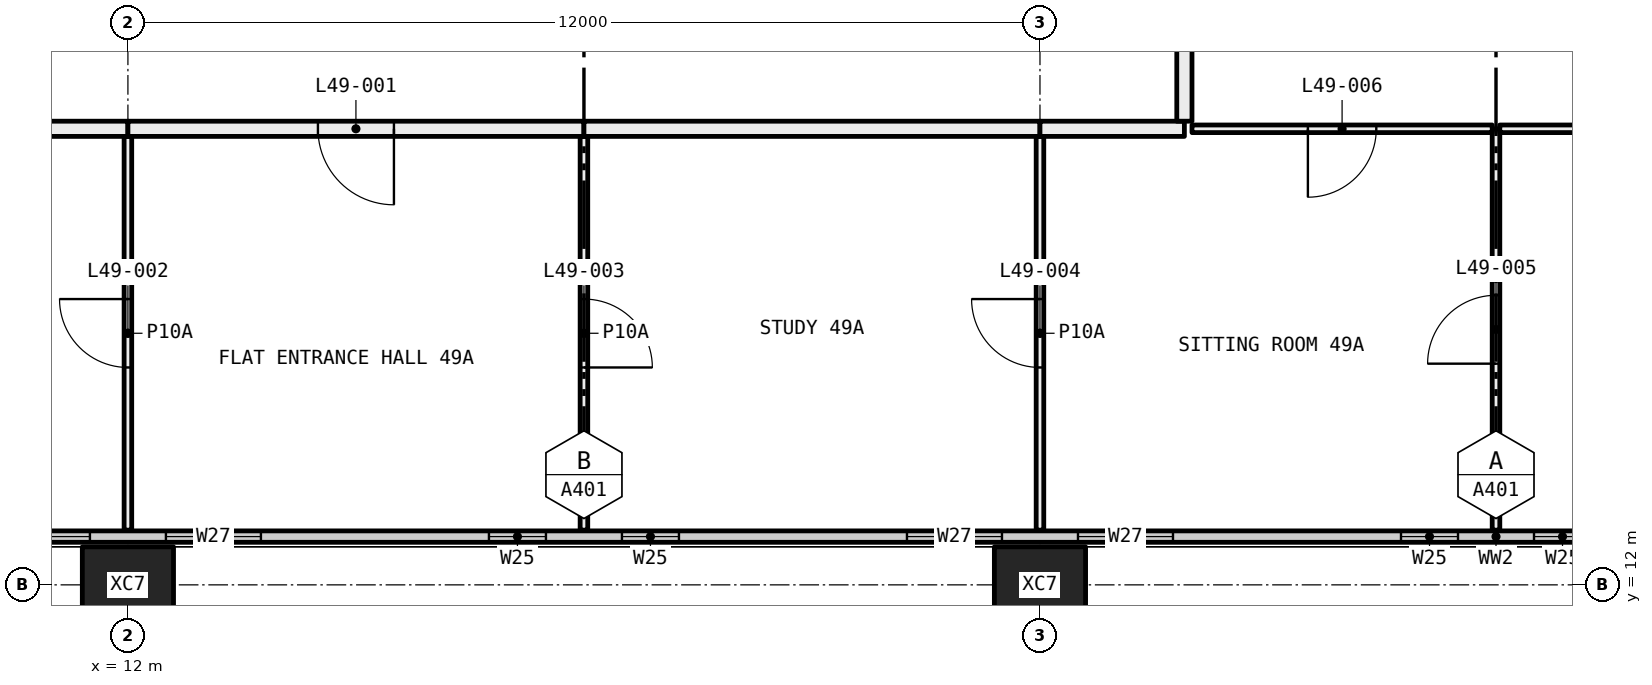
"""IFC4 building model, lengths in metres.
Left out: names, types, materials, properties, quantities, classifications, styles, units other than length and angle.
Written with IfcOpenShell. Run it as: python <this file> out.ifc"""

import sys

from ifc_helpers import new_model, si_unit, direction, frame, frame_2d, origin, origin_2d, place, context, subcontext, project, spatial, rectangle, hollow_rectangle, extrude, element, fill, save


model = new_model("IFC4")
c1 = context("Model", 3, precision=1e-05, world=origin(), true_north=direction((0.0, 1.0)))
c2 = subcontext(c1, "Body", "Model", "MODEL_VIEW")
j1 = project(units=[si_unit("LENGTHUNIT", "METRE"), si_unit("PLANEANGLEUNIT", "RADIAN")], contexts=[c1])
p1 = place(None, origin())
s1 = spatial("IfcSite", under=j1, at=p1, CompositionType="ELEMENT")
p2 = place(p1, origin())
s2 = spatial("IfcBuilding", under=s1, at=p2, CompositionType="ELEMENT")
p3 = place(p2, frame((0.0, 0.0, 185.85)))
s3 = spatial("IfcBuildingStorey", under=s2, at=p3, CompositionType="ELEMENT", Elevation=185.85)
for number, where, z_axis, x_axis in (
    (1, (12.0, 12.0, -0.4), (0.0, 0.0, 1.0), (1.0, 0.0, 0.0)),
    (2, (24.0, 12.0, -0.4), (0.0, 0.0, 1.0), (1.0, 0.0, 0.0)),
):
    element("IfcColumn", number, at=place(p3, frame(where, z_axis=z_axis, x_axis=x_axis)), inside=s3, PredefinedType="COLUMN", context=c2, shape_type="SweptSolid", body=[
        extrude(hollow_rectangle(XDim=1.2, YDim=1.0, WallThickness=0.045, at=origin_2d()), origin(), (0.0, 0.0, 1.0), 3.45),
    ])
p4 = place(p3, frame((6.56, 12.635, 0.0), z_axis=(0.0, 0.0, 1.0), x_axis=(1.0, 0.0, 0.0)))
e3 = element("IfcWall", 3, at=p4, inside=s3, PredefinedType="ELEMENTEDWALL", context=c2, shape_type="SweptSolid", body=[
    extrude(rectangle(XDim=46.88, YDim=0.15, at=frame_2d((23.44, 0.0))), origin(), (0.0, 0.0, 1.0), 3.05),
])
p5 = place(p4, frame((0.44, 0.0, 0.45)))
e4 = element("IfcOpeningElement", 4, at=p5, cuts=e3, PredefinedType="OPENING", context=c2, shape_type="SweptSolid", body=[
    extrude(rectangle(XDim=4.5, YDim=2.55, at=frame_2d((2.25, 1.275))), frame((0.0, 0.085, 0.0), z_axis=(0.0, -1.0, 0.0), x_axis=(1.0, 0.0, 0.0)), (0.0, 0.0, 1.0), 0.17),
])
p6 = place(p4, frame((5.94, 0.0, 0.45)))
e5 = element("IfcOpeningElement", 5, at=p6, cuts=e3, PredefinedType="OPENING", context=c2, shape_type="SweptSolid", body=[
    extrude(rectangle(XDim=1.25, YDim=2.55, at=frame_2d((0.625, 1.275))), frame((0.0, 0.085, 0.0), z_axis=(0.0, -1.0, 0.0), x_axis=(1.0, 0.0, 0.0)), (0.0, 0.0, 1.0), 0.17),
])
p7 = place(p4, frame((10.19, 0.0, 0.45)))
e6 = element("IfcOpeningElement", 6, at=p7, cuts=e3, PredefinedType="OPENING", context=c2, shape_type="SweptSolid", body=[
    extrude(rectangle(XDim=0.75, YDim=2.55, at=frame_2d((0.375, 1.275))), frame((0.0, 0.085, 0.0), z_axis=(0.0, -1.0, 0.0), x_axis=(1.0, 0.0, 0.0)), (0.0, 0.0, 1.0), 0.17),
])
p8 = place(p4, frame((11.94, 0.0, 0.45)))
e7 = element("IfcOpeningElement", 7, at=p8, cuts=e3, PredefinedType="OPENING", context=c2, shape_type="SweptSolid", body=[
    extrude(rectangle(XDim=0.75, YDim=2.55, at=frame_2d((0.375, 1.275))), frame((0.0, 0.085, 0.0), z_axis=(0.0, -1.0, 0.0), x_axis=(1.0, 0.0, 0.0)), (0.0, 0.0, 1.0), 0.17),
])
p9 = place(p4, frame((15.69, 0.0, 0.45)))
e8 = element("IfcOpeningElement", 8, at=p9, cuts=e3, PredefinedType="OPENING", context=c2, shape_type="SweptSolid", body=[
    extrude(rectangle(XDim=1.25, YDim=2.55, at=frame_2d((0.625, 1.275))), frame((0.0, 0.085, 0.0), z_axis=(0.0, -1.0, 0.0), x_axis=(1.0, 0.0, 0.0)), (0.0, 0.0, 1.0), 0.17),
])
p10 = place(p4, frame((17.94, 0.0, 0.45)))
e9 = element("IfcOpeningElement", 9, at=p10, cuts=e3, PredefinedType="OPENING", context=c2, shape_type="SweptSolid", body=[
    extrude(rectangle(XDim=1.25, YDim=2.55, at=frame_2d((0.625, 1.275))), frame((0.0, 0.085, 0.0), z_axis=(0.0, -1.0, 0.0), x_axis=(1.0, 0.0, 0.0)), (0.0, 0.0, 1.0), 0.17),
])
p11 = place(p4, frame((22.19, 0.0, 0.45)))
e10 = element("IfcOpeningElement", 10, at=p11, cuts=e3, PredefinedType="OPENING", context=c2, shape_type="SweptSolid", body=[
    extrude(rectangle(XDim=0.75, YDim=2.55, at=frame_2d((0.375, 1.275))), frame((0.0, 0.085, 0.0), z_axis=(0.0, -1.0, 0.0), x_axis=(1.0, 0.0, 0.0)), (0.0, 0.0, 1.0), 0.17),
])
p12 = place(p4, frame((23.94, 0.0, 0.45)))
e11 = element("IfcOpeningElement", 11, at=p12, cuts=e3, PredefinedType="OPENING", context=c2, shape_type="SweptSolid", body=[
    extrude(rectangle(XDim=0.75, YDim=2.55, at=frame_2d((0.375, 1.275))), frame((0.0, 0.085, 0.0), z_axis=(0.0, -1.0, 0.0), x_axis=(1.0, 0.0, 0.0)), (0.0, 0.0, 1.0), 0.17),
])
p13 = place(p4, frame((27.69, 0.0, 0.45)))
e12 = element("IfcOpeningElement", 12, at=p13, cuts=e3, PredefinedType="OPENING", context=c2, shape_type="SweptSolid", body=[
    extrude(rectangle(XDim=1.25, YDim=2.55, at=frame_2d((0.625, 1.275))), frame((0.0, 0.085, 0.0), z_axis=(0.0, -1.0, 0.0), x_axis=(1.0, 0.0, 0.0)), (0.0, 0.0, 1.0), 0.17),
])
p14 = place(p4, frame((29.94, 0.0, 0.45)))
e13 = element("IfcOpeningElement", 13, at=p14, cuts=e3, PredefinedType="OPENING", context=c2, shape_type="SweptSolid", body=[
    extrude(rectangle(XDim=1.25, YDim=2.55, at=frame_2d((0.625, 1.275))), frame((0.0, 0.085, 0.0), z_axis=(0.0, -1.0, 0.0), x_axis=(1.0, 0.0, 0.0)), (0.0, 0.0, 1.0), 0.17),
])
p15 = place(p4, frame((34.19, 0.0, 0.45)))
e14 = element("IfcOpeningElement", 14, at=p15, cuts=e3, PredefinedType="OPENING", context=c2, shape_type="SweptSolid", body=[
    extrude(rectangle(XDim=0.75, YDim=2.55, at=frame_2d((0.375, 1.275))), frame((0.0, 0.085, 0.0), z_axis=(0.0, -1.0, 0.0), x_axis=(1.0, 0.0, 0.0)), (0.0, 0.0, 1.0), 0.17),
])
p16 = place(p4, frame((35.94, 0.0, 0.45)))
e15 = element("IfcOpeningElement", 15, at=p16, cuts=e3, PredefinedType="OPENING", context=c2, shape_type="SweptSolid", body=[
    extrude(rectangle(XDim=0.75, YDim=2.55, at=frame_2d((0.375, 1.275))), frame((0.0, 0.085, 0.0), z_axis=(0.0, -1.0, 0.0), x_axis=(1.0, 0.0, 0.0)), (0.0, 0.0, 1.0), 0.17),
])
p17 = place(p4, frame((39.69, 0.0, 0.45)))
e16 = element("IfcOpeningElement", 16, at=p17, cuts=e3, PredefinedType="OPENING", context=c2, shape_type="SweptSolid", body=[
    extrude(rectangle(XDim=1.25, YDim=2.55, at=frame_2d((0.625, 1.275))), frame((0.0, 0.085, 0.0), z_axis=(0.0, -1.0, 0.0), x_axis=(1.0, 0.0, 0.0)), (0.0, 0.0, 1.0), 0.17),
])
p18 = place(p4, frame((41.94, 0.0, 0.45)))
e17 = element("IfcOpeningElement", 17, at=p18, cuts=e3, PredefinedType="OPENING", context=c2, shape_type="SweptSolid", body=[
    extrude(rectangle(XDim=4.5, YDim=2.55, at=frame_2d((2.25, 1.275))), frame((0.0, 0.085, 0.0), z_axis=(0.0, -1.0, 0.0), x_axis=(1.0, 0.0, 0.0)), (0.0, 0.0, 1.0), 0.17),
])
p19 = place(p3, frame((12.0, 12.72, 0.0), z_axis=(0.0, 0.0, 1.0), x_axis=(0.0, 1.0, 0.0)))
e18 = element("IfcWall", 18, at=p19, inside=s3, PredefinedType="PARTITIONING", context=c2, shape_type="SweptSolid", body=[
    extrude(rectangle(XDim=5.18, YDim=0.1, at=frame_2d((2.59, 0.0))), origin(), (0.0, 0.0, 1.0), 3.05),
])
p20 = place(p19, frame((2.14, 0.0, 0.0)))
e19 = element("IfcOpeningElement", 19, at=p20, cuts=e18, PredefinedType="OPENING", context=c2, shape_type="SweptSolid", body=[
    extrude(rectangle(XDim=0.9, YDim=2.1, at=frame_2d((0.45, 1.05))), frame((0.0, 0.06, 0.0), z_axis=(0.0, -1.0, 0.0), x_axis=(1.0, 0.0, 0.0)), (0.0, 0.0, 1.0), 0.12),
])
p21 = place(p3, frame((12.0, 18.0, 0.0), z_axis=(0.0, 0.0, 1.0), x_axis=(-1.0, 0.0, 0.0)))
e20 = element("IfcWall", 20, at=p21, inside=s3, PredefinedType="PARTITIONING", context=c2, shape_type="SweptSolid", body=[
    extrude(rectangle(XDim=1.9, YDim=0.2, at=frame_2d((0.95, 0.0))), origin(), (0.0, 0.0, 1.0), 3.05),
])
p22 = place(p3, frame((18.0, 12.72, 0.0), z_axis=(0.0, 0.0, 1.0), x_axis=(0.0, 1.0, 0.0)))
e21 = element("IfcWall", 21, at=p22, inside=s3, PredefinedType="PARTITIONING", context=c2, shape_type="SweptSolid", body=[
    extrude(rectangle(XDim=5.18, YDim=0.1, at=frame_2d((2.59, 0.0))), origin(), (0.0, 0.0, 1.0), 3.05),
])
p23 = place(p22, frame((2.14, 0.0, 0.0)))
e22 = element("IfcOpeningElement", 22, at=p23, cuts=e21, PredefinedType="OPENING", context=c2, shape_type="SweptSolid", body=[
    extrude(rectangle(XDim=0.9, YDim=2.1, at=frame_2d((0.45, 1.05))), frame((0.0, 0.06, 0.0), z_axis=(0.0, -1.0, 0.0), x_axis=(1.0, 0.0, 0.0)), (0.0, 0.0, 1.0), 0.12),
])
p24 = place(p3, frame((18.0, 18.0, 0.0), z_axis=(0.0, 0.0, 1.0), x_axis=(-1.0, 0.0, 0.0)))
e23 = element("IfcWall", 23, at=p24, inside=s3, PredefinedType="PARTITIONING", context=c2, shape_type="SweptSolid", body=[
    extrude(rectangle(XDim=6.0, YDim=0.2, at=frame_2d((3.0, 0.0))), origin(), (0.0, 0.0, 1.0), 3.05),
])
p25 = place(p24, frame((2.5, 0.0, 0.0)))
e24 = element("IfcOpeningElement", 24, at=p25, cuts=e23, PredefinedType="OPENING", context=c2, shape_type="SweptSolid", body=[
    extrude(rectangle(XDim=1.0, YDim=2.1, at=frame_2d((0.5, 1.05))), frame((0.0, 0.11, 0.0), z_axis=(0.0, -1.0, 0.0), x_axis=(1.0, 0.0, 0.0)), (0.0, 0.0, 1.0), 0.22),
])
p26 = place(p3, frame((24.0, 12.72, 0.0), z_axis=(0.0, 0.0, 1.0), x_axis=(0.0, 1.0, 0.0)))
e25 = element("IfcWall", 25, at=p26, inside=s3, PredefinedType="PARTITIONING", context=c2, shape_type="SweptSolid", body=[
    extrude(rectangle(XDim=5.18, YDim=0.1, at=frame_2d((2.59, 0.0))), origin(), (0.0, 0.0, 1.0), 3.05),
])
p27 = place(p26, frame((2.14, 0.0, 0.0)))
e26 = element("IfcOpeningElement", 26, at=p27, cuts=e25, PredefinedType="OPENING", context=c2, shape_type="SweptSolid", body=[
    extrude(rectangle(XDim=0.9, YDim=2.1, at=frame_2d((0.45, 1.05))), frame((0.0, 0.06, 0.0), z_axis=(0.0, -1.0, 0.0), x_axis=(1.0, 0.0, 0.0)), (0.0, 0.0, 1.0), 0.12),
])
p28 = place(p3, frame((24.0, 18.0, 0.0), z_axis=(0.0, 0.0, 1.0), x_axis=(-1.0, 0.0, 0.0)))
e27 = element("IfcWall", 27, at=p28, inside=s3, PredefinedType="PARTITIONING", context=c2, shape_type="SweptSolid", body=[
    extrude(rectangle(XDim=6.0, YDim=0.2, at=frame_2d((3.0, 0.0))), origin(), (0.0, 0.0, 1.0), 3.05),
])
p29 = place(p3, frame((30.0, 12.72, 0.0), z_axis=(0.0, 0.0, 1.0), x_axis=(0.0, 1.0, 0.0)))
e28 = element("IfcWall", 28, at=p29, inside=s3, PredefinedType="PARTITIONING", context=c2, shape_type="SweptSolid", body=[
    extrude(rectangle(XDim=5.28, YDim=0.1, at=frame_2d((2.64, 0.0))), origin(), (0.0, 0.0, 1.0), 3.05),
])
p30 = place(p29, frame((2.19, 0.0, 0.0)))
e29 = element("IfcOpeningElement", 29, at=p30, cuts=e28, PredefinedType="OPENING", context=c2, shape_type="SweptSolid", body=[
    extrude(rectangle(XDim=0.9, YDim=2.1, at=frame_2d((0.45, 1.05))), frame((0.0, 0.06, 0.0), z_axis=(0.0, -1.0, 0.0), x_axis=(1.0, 0.0, 0.0)), (0.0, 0.0, 1.0), 0.12),
])
p31 = place(p3, frame((29.95, 18.0, 0.0), z_axis=(0.0, 0.0, 1.0), x_axis=(-1.0, 0.0, 0.0)))
e30 = element("IfcWall", 30, at=p31, inside=s3, PredefinedType="PARTITIONING", context=c2, shape_type="SweptSolid", body=[
    extrude(rectangle(XDim=3.95, YDim=0.1, at=frame_2d((1.975, 0.0))), origin(), (0.0, 0.0, 1.0), 3.05),
])
p32 = place(p31, frame((1.525, 0.0, 0.0)))
e31 = element("IfcOpeningElement", 31, at=p32, cuts=e30, PredefinedType="OPENING", context=c2, shape_type="SweptSolid", body=[
    extrude(rectangle(XDim=0.9, YDim=2.1, at=frame_2d((0.45, 1.05))), frame((0.0, 0.06, 0.0), z_axis=(0.0, -1.0, 0.0), x_axis=(1.0, 0.0, 0.0)), (0.0, 0.0, 1.0), 0.12),
])
p33 = place(p3, frame((25.9, 18.0, 0.0), z_axis=(0.0, 0.0, 1.0), x_axis=(-1.0, 0.0, 0.0)))
e32 = element("IfcWall", 32, at=p33, inside=s3, PredefinedType="PARTITIONING", context=c2, shape_type="SweptSolid", body=[
    extrude(rectangle(XDim=1.9, YDim=0.2, at=frame_2d((0.95, 0.0))), origin(), (0.0, 0.0, 1.0), 3.05),
])
p34 = place(p3, frame((31.5, 18.0, 0.0), z_axis=(0.0, 0.0, 1.0), x_axis=(-1.0, 0.0, 0.0)))
e33 = element("IfcWall", 33, at=p34, inside=s3, PredefinedType="PARTITIONING", context=c2, shape_type="SweptSolid", body=[
    extrude(rectangle(XDim=1.45, YDim=0.1, at=frame_2d((0.725, 0.0))), origin(), (0.0, 0.0, 1.0), 3.05),
])
p35 = place(p3, frame((25.9, 23.9, 0.0), z_axis=(0.0, 0.0, 1.0), x_axis=(0.0, -1.0, 0.0)))
e34 = element("IfcWall", 34, at=p35, inside=s3, PredefinedType="PARTITIONING", context=c2, shape_type="SweptSolid", body=[
    extrude(rectangle(XDim=5.8, YDim=0.2, at=frame_2d((2.9, 0.0))), origin(), (0.0, 0.0, 1.0), 3.05),
])
p36 = place(p5, origin())
e35 = element("IfcWindow", 35, at=p36, inside=s3, PartitioningType="SINGLE_PANEL", PredefinedType="WINDOW", context=c2, shape_type="SweptSolid", body=[
    extrude(rectangle(XDim=4.5, YDim=2.55, at=frame_2d((2.25, 1.275))), frame((0.0, 0.03, 0.0), z_axis=(0.0, -1.0, 0.0), x_axis=(1.0, 0.0, 0.0)), (0.0, 0.0, 1.0), 0.06),
])
fill(e4, e35)
p37 = place(p6, origin())
e36 = element("IfcWindow", 36, at=p37, inside=s3, PartitioningType="SINGLE_PANEL", PredefinedType="WINDOW", context=c2, shape_type="SweptSolid", body=[
    extrude(rectangle(XDim=1.25, YDim=2.55, at=frame_2d((0.625, 1.275))), frame((0.0, 0.03, 0.0), z_axis=(0.0, -1.0, 0.0), x_axis=(1.0, 0.0, 0.0)), (0.0, 0.0, 1.0), 0.06),
])
fill(e5, e36)
p38 = place(p7, origin())
e37 = element("IfcWindow", 37, at=p38, inside=s3, PartitioningType="SINGLE_PANEL", PredefinedType="WINDOW", context=c2, shape_type="SweptSolid", body=[
    extrude(rectangle(XDim=0.75, YDim=2.55, at=frame_2d((0.375, 1.275))), frame((0.0, 0.03, 0.0), z_axis=(0.0, -1.0, 0.0), x_axis=(1.0, 0.0, 0.0)), (0.0, 0.0, 1.0), 0.06),
])
fill(e6, e37)
p39 = place(p8, origin())
e38 = element("IfcWindow", 38, at=p39, inside=s3, PartitioningType="SINGLE_PANEL", PredefinedType="WINDOW", context=c2, shape_type="SweptSolid", body=[
    extrude(rectangle(XDim=0.75, YDim=2.55, at=frame_2d((0.375, 1.275))), frame((0.0, 0.03, 0.0), z_axis=(0.0, -1.0, 0.0), x_axis=(1.0, 0.0, 0.0)), (0.0, 0.0, 1.0), 0.06),
])
fill(e7, e38)
p40 = place(p9, origin())
e39 = element("IfcWindow", 39, at=p40, inside=s3, PartitioningType="SINGLE_PANEL", PredefinedType="WINDOW", context=c2, shape_type="SweptSolid", body=[
    extrude(rectangle(XDim=1.25, YDim=2.55, at=frame_2d((0.625, 1.275))), frame((0.0, 0.03, 0.0), z_axis=(0.0, -1.0, 0.0), x_axis=(1.0, 0.0, 0.0)), (0.0, 0.0, 1.0), 0.06),
])
fill(e8, e39)
p41 = place(p10, origin())
e40 = element("IfcWindow", 40, at=p41, inside=s3, PartitioningType="SINGLE_PANEL", PredefinedType="WINDOW", context=c2, shape_type="SweptSolid", body=[
    extrude(rectangle(XDim=1.25, YDim=2.55, at=frame_2d((0.625, 1.275))), frame((0.0, 0.03, 0.0), z_axis=(0.0, -1.0, 0.0), x_axis=(1.0, 0.0, 0.0)), (0.0, 0.0, 1.0), 0.06),
])
fill(e9, e40)
p42 = place(p11, origin())
e41 = element("IfcWindow", 41, at=p42, inside=s3, PartitioningType="SINGLE_PANEL", PredefinedType="WINDOW", context=c2, shape_type="SweptSolid", body=[
    extrude(rectangle(XDim=0.75, YDim=2.55, at=frame_2d((0.375, 1.275))), frame((0.0, 0.03, 0.0), z_axis=(0.0, -1.0, 0.0), x_axis=(1.0, 0.0, 0.0)), (0.0, 0.0, 1.0), 0.06),
])
fill(e10, e41)
p43 = place(p12, origin())
e42 = element("IfcWindow", 42, at=p43, inside=s3, PartitioningType="SINGLE_PANEL", PredefinedType="WINDOW", context=c2, shape_type="SweptSolid", body=[
    extrude(rectangle(XDim=0.75, YDim=2.55, at=frame_2d((0.375, 1.275))), frame((0.0, 0.03, 0.0), z_axis=(0.0, -1.0, 0.0), x_axis=(1.0, 0.0, 0.0)), (0.0, 0.0, 1.0), 0.06),
])
fill(e11, e42)
p44 = place(p25, origin())
e43 = element("IfcDoor", 43, at=p44, inside=s3, OperationType="SINGLE_SWING_RIGHT", PredefinedType="DOOR", context=c2, shape_type="SweptSolid", body=[
    extrude(rectangle(XDim=1.0, YDim=2.1, at=frame_2d((0.5, 1.05))), frame((0.0, 0.025, 0.0), z_axis=(0.0, -1.0, 0.0), x_axis=(1.0, 0.0, 0.0)), (0.0, 0.0, 1.0), 0.05),
])
fill(e24, e43)
p45 = place(p20, origin())
e44 = element("IfcDoor", 44, at=p45, inside=s3, OperationType="SINGLE_SWING_LEFT", PredefinedType="DOOR", context=c2, shape_type="SweptSolid", body=[
    extrude(rectangle(XDim=0.9, YDim=2.1, at=frame_2d((0.45, 1.05))), frame((0.0, 0.025, 0.0), z_axis=(0.0, -1.0, 0.0), x_axis=(1.0, 0.0, 0.0)), (0.0, 0.0, 1.0), 0.05),
])
fill(e19, e44)
p46 = place(p23, frame((0.9, 0.0, 0.0), x_axis=(-1.0, 0.0, 0.0)))
e45 = element("IfcDoor", 45, at=p46, inside=s3, OperationType="SINGLE_SWING_LEFT", PredefinedType="DOOR", context=c2, shape_type="SweptSolid", body=[
    extrude(rectangle(XDim=0.9, YDim=2.1, at=frame_2d((0.45, 1.05))), frame((0.0, 0.025, 0.0), z_axis=(0.0, -1.0, 0.0), x_axis=(1.0, 0.0, 0.0)), (0.0, 0.0, 1.0), 0.05),
])
fill(e22, e45)
p47 = place(p27, origin())
e46 = element("IfcDoor", 46, at=p47, inside=s3, OperationType="SINGLE_SWING_LEFT", PredefinedType="DOOR", context=c2, shape_type="SweptSolid", body=[
    extrude(rectangle(XDim=0.9, YDim=2.1, at=frame_2d((0.45, 1.05))), frame((0.0, 0.025, 0.0), z_axis=(0.0, -1.0, 0.0), x_axis=(1.0, 0.0, 0.0)), (0.0, 0.0, 1.0), 0.05),
])
fill(e26, e46)
p48 = place(p30, origin())
e47 = element("IfcDoor", 47, at=p48, inside=s3, OperationType="SINGLE_SWING_RIGHT", PredefinedType="DOOR", context=c2, shape_type="SweptSolid", body=[
    extrude(rectangle(XDim=0.9, YDim=2.1, at=frame_2d((0.45, 1.05))), frame((0.0, 0.025, 0.0), z_axis=(0.0, -1.0, 0.0), x_axis=(1.0, 0.0, 0.0)), (0.0, 0.0, 1.0), 0.05),
])
fill(e29, e47)
p49 = place(p32, origin())
e48 = element("IfcDoor", 48, at=p49, inside=s3, OperationType="SINGLE_SWING_LEFT", PredefinedType="DOOR", context=c2, shape_type="SweptSolid", body=[
    extrude(rectangle(XDim=0.9, YDim=2.1, at=frame_2d((0.45, 1.05))), frame((0.0, 0.025, 0.0), z_axis=(0.0, -1.0, 0.0), x_axis=(1.0, 0.0, 0.0)), (0.0, 0.0, 1.0), 0.05),
])
fill(e31, e48)
save(model, sys.argv[1])
